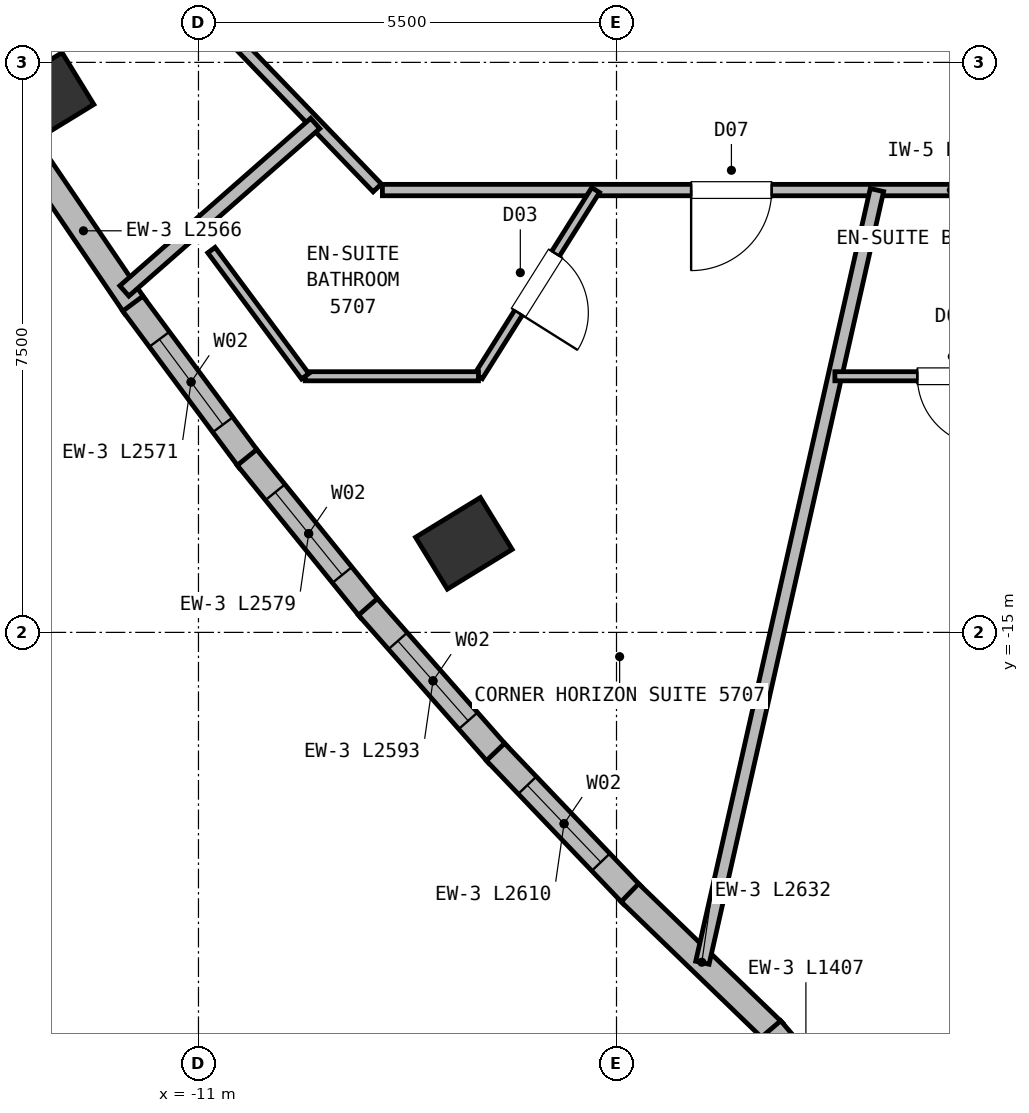
"""IFC4 building model, lengths in metres.
Left out: names, types, materials, properties, quantities, classifications, styles, units other than length and angle.
Written with IfcOpenShell. Run it as: python <this file> out.ifc"""

import sys

from ifc_helpers import new_model, si_unit, direction, frame, frame_2d, origin, origin_2d, place, context, subcontext, project, spatial, rectangle, extrude, element, fill, save


model = new_model("IFC4")
c1 = context("Model", 3, precision=1e-05, world=origin(), true_north=direction((0.0, 1.0)))
c2 = subcontext(c1, "Body", "Model", "MODEL_VIEW")
j1 = project(units=[si_unit("LENGTHUNIT", "METRE"), si_unit("PLANEANGLEUNIT", "RADIAN")], contexts=[c1])
p1 = place(None, origin())
s1 = spatial("IfcSite", under=j1, at=p1, CompositionType="ELEMENT")
p2 = place(p1, origin())
s2 = spatial("IfcBuilding", under=s1, at=p2, CompositionType="ELEMENT")
p3 = place(p2, frame((0.0, 0.0, 216.95)))
s3 = spatial("IfcBuildingStorey", under=s2, at=p3, CompositionType="ELEMENT", Elevation=216.95)
for number, where, z_axis, x_axis in (
    (1, (-13.012, -7.974, 0.0), (0.0, 0.0, 1.0), (-0.522, 0.853, 0.0)),
    (2, (-7.508, -13.828, 0.0), (0.0, 0.0, 1.0), (-0.522, 0.853, 0.0)),
):
    element("IfcColumn", number, at=place(p3, frame(where, z_axis=z_axis, x_axis=x_axis)), inside=s3, PredefinedType="COLUMN", context=c2, shape_type="SweptSolid", body=[
        extrude(rectangle(XDim=0.8, YDim=1.0, at=origin_2d()), origin(), (0.0, 0.0, 1.0), 3.8),
    ])
p4 = place(p3, frame((-11.834, -10.715, 0.0), z_axis=(0.0, 0.0, 1.0), x_axis=(-0.562164288669, 0.827025581554, 0.0)))
e3 = element("IfcWall", 3, at=p4, inside=s3, PredefinedType="SOLIDWALL", context=c2, shape_type="SweptSolid", body=[
    extrude(rectangle(XDim=2.566, YDim=0.33, at=frame_2d((1.283, 0.0))), origin(), (0.0, 0.0, 1.0), 3.55),
])
p5 = place(p3, frame((-10.331, -12.738, 0.0), z_axis=(0.0, 0.0, 1.0), x_axis=(-0.596178851143, 0.802851653451, 0.0)))
e4 = element("IfcWall", 4, at=p5, inside=s3, PredefinedType="SOLIDWALL", context=c2, shape_type="SweptSolid", body=[
    extrude(rectangle(XDim=2.571, YDim=0.33, at=frame_2d((1.285, 0.0))), origin(), (0.0, 0.0, 1.0), 3.55),
])
p6 = place(p5, frame((0.585, 0.0, 0.72)))
e5 = element("IfcOpeningElement", 5, at=p6, cuts=e4, PredefinedType="OPENING", context=c2, shape_type="SweptSolid", body=[
    extrude(rectangle(XDim=1.4, YDim=1.84, at=frame_2d((0.7, 0.92))), frame((0.0, 0.175, 0.0), z_axis=(0.0, -1.0, 0.0), x_axis=(1.0, 0.0, 0.0)), (0.0, 0.0, 1.0), 0.35),
])
p7 = place(p3, frame((-8.739, -14.703, 0.0), z_axis=(0.0, 0.0, 1.0), x_axis=(-0.629151938827, 0.777282341154, 0.0)))
e6 = element("IfcWall", 6, at=p7, inside=s3, PredefinedType="SOLIDWALL", context=c2, shape_type="SweptSolid", body=[
    extrude(rectangle(XDim=2.579, YDim=0.33, at=frame_2d((1.29, 0.0))), origin(), (0.0, 0.0, 1.0), 3.55),
])
p8 = place(p7, frame((0.59, 0.0, 0.72)))
e7 = element("IfcOpeningElement", 7, at=p8, cuts=e6, PredefinedType="OPENING", context=c2, shape_type="SweptSolid", body=[
    extrude(rectangle(XDim=1.4, YDim=1.84, at=frame_2d((0.7, 0.92))), frame((0.0, 0.175, 0.0), z_axis=(0.0, -1.0, 0.0), x_axis=(1.0, 0.0, 0.0)), (0.0, 0.0, 1.0), 0.35),
])
p9 = place(p3, frame((-7.058, -16.611, 0.0), z_axis=(0.0, 0.0, 1.0), x_axis=(-0.660708561144, 0.75064252293, 0.0)))
e8 = element("IfcWall", 8, at=p9, inside=s3, PredefinedType="SOLIDWALL", context=c2, shape_type="SweptSolid", body=[
    extrude(rectangle(XDim=2.593, YDim=0.33, at=frame_2d((1.296, 0.0))), origin(), (0.0, 0.0, 1.0), 3.55),
])
p10 = place(p9, frame((0.596, 0.0, 0.72)))
e9 = element("IfcOpeningElement", 9, at=p10, cuts=e8, PredefinedType="OPENING", context=c2, shape_type="SweptSolid", body=[
    extrude(rectangle(XDim=1.4, YDim=1.84, at=frame_2d((0.7, 0.92))), frame((0.0, 0.175, 0.0), z_axis=(0.0, -1.0, 0.0), x_axis=(1.0, 0.0, 0.0)), (0.0, 0.0, 1.0), 0.35),
])
p11 = place(p3, frame((-5.289, -18.461, 0.0), z_axis=(0.0, 0.0, 1.0), x_axis=(-0.690836041792, 0.723011454516, 0.0)))
e10 = element("IfcWall", 10, at=p11, inside=s3, PredefinedType="SOLIDWALL", context=c2, shape_type="SweptSolid", body=[
    extrude(rectangle(XDim=2.61, YDim=0.33, at=frame_2d((1.305, 0.0))), origin(), (0.0, 0.0, 1.0), 3.55),
])
p12 = place(p11, frame((0.605, 0.0, 0.72)))
e11 = element("IfcOpeningElement", 11, at=p12, cuts=e10, PredefinedType="OPENING", context=c2, shape_type="SweptSolid", body=[
    extrude(rectangle(XDim=1.4, YDim=1.84, at=frame_2d((0.7, 0.92))), frame((0.0, 0.175, 0.0), z_axis=(0.0, -1.0, 0.0), x_axis=(1.0, 0.0, 0.0)), (0.0, 0.0, 1.0), 0.35),
])
p13 = place(p3, frame((-3.431, -20.254, 0.0), z_axis=(0.0, 0.0, 1.0), x_axis=(-0.719291162425, 0.694708732964, 0.0)))
e12 = element("IfcWall", 12, at=p13, inside=s3, PredefinedType="SOLIDWALL", context=c2, shape_type="SweptSolid", body=[
    extrude(rectangle(XDim=2.632, YDim=0.33, at=frame_2d((1.316, 0.0))), origin(), (0.0, 0.0, 1.0), 3.55),
])
p14 = place(p3, frame((-2.551, -21.288, 0.0), z_axis=(0.0, 0.0, 1.0), x_axis=(-0.649318671118, 0.760516445146, 0.0)))
e13 = element("IfcWall", 13, at=p14, inside=s3, PredefinedType="SOLIDWALL", context=c2, shape_type="SweptSolid", body=[
    extrude(rectangle(XDim=1.407, YDim=0.33, at=frame_2d((0.704, 0.0))), origin(), (0.0, 0.0, 1.0), 3.55),
])
p15 = place(p3, frame((8.58, -9.18, 0.0), z_axis=(0.0, 0.0, 1.0), x_axis=(-1.0, 0.0, 0.0)))
e14 = element("IfcWall", 14, at=p15, inside=s3, PredefinedType="PARTITIONING", context=c2, shape_type="SweptSolid", body=[
    extrude(rectangle(XDim=17.16, YDim=0.15, at=frame_2d((8.58, 0.0))), origin(), (0.0, 0.0, 1.0), 3.23),
])
p16 = place(p15, frame((3.916, 0.0, 0.0)))
e15 = element("IfcOpeningElement", 15, at=p16, cuts=e14, PredefinedType="OPENING", context=c2, shape_type="SweptSolid", body=[
    extrude(rectangle(XDim=0.95, YDim=2.1, at=frame_2d((0.475, 1.05))), frame((0.0, 0.085, 0.0), z_axis=(0.0, -1.0, 0.0), x_axis=(1.0, 0.0, 0.0)), (0.0, 0.0, 1.0), 0.17),
])
p17 = place(p15, frame((1.363, 0.0, 0.0)))
e16 = element("IfcOpeningElement", 16, at=p17, cuts=e14, PredefinedType="OPENING", context=c2, shape_type="SweptSolid", body=[
    extrude(rectangle(XDim=1.0, YDim=2.15, at=frame_2d((0.5, 1.075))), frame((0.0, 0.085, 0.0), z_axis=(0.0, -1.0, 0.0), x_axis=(1.0, 0.0, 0.0)), (0.0, 0.0, 1.0), 0.17),
])
p18 = place(p15, frame((12.038, 0.0, 0.0)))
e17 = element("IfcOpeningElement", 17, at=p18, cuts=e14, PredefinedType="OPENING", context=c2, shape_type="SweptSolid", body=[
    extrude(rectangle(XDim=1.06, YDim=2.15, at=frame_2d((0.53, 1.075))), frame((0.0, 0.085, 0.0), z_axis=(0.0, -1.0, 0.0), x_axis=(1.0, 0.0, 0.0)), (0.0, 0.0, 1.0), 0.17),
])
p19 = place(p15, frame((6.251, 0.0, 0.0)))
e18 = element("IfcOpeningElement", 18, at=p19, cuts=e14, PredefinedType="OPENING", context=c2, shape_type="SweptSolid", body=[
    extrude(rectangle(XDim=1.06, YDim=2.15, at=frame_2d((0.53, 1.075))), frame((0.0, 0.085, 0.0), z_axis=(0.0, -1.0, 0.0), x_axis=(1.0, 0.0, 0.0)), (0.0, 0.0, 1.0), 0.17),
])
p20 = place(p3, frame((-8.648, -9.151, 0.0), z_axis=(0.0, 0.0, 1.0), x_axis=(-0.693764562202, 0.720201869085, 0.0)))
e19 = element("IfcWall", 19, at=p20, inside=s3, PredefinedType="PARTITIONING", context=c2, shape_type="SweptSolid", body=[
    extrude(rectangle(XDim=2.558, YDim=0.15, at=frame_2d((1.279, 0.0))), origin(), (0.0, 0.0, 1.0), 3.23),
])
p21 = place(p3, frame((-9.464, -8.304, 0.0), z_axis=(0.0, 0.0, 1.0), x_axis=(-0.751711445712, -0.659492154909, 0.0)))
e20 = element("IfcWall", 20, at=p21, inside=s3, PredefinedType="PARTITIONING", context=c2, shape_type="SweptSolid", body=[
    extrude(rectangle(XDim=3.341, YDim=0.18, at=frame_2d((1.67, 0.0))), origin(), (0.0, 0.0, 1.0), 3.55),
])
p22 = place(p3, frame((-5.775, -9.18, 0.0), z_axis=(0.0, 0.0, 1.0), x_axis=(-0.532491083383, -0.846435612506, 0.0)))
e21 = element("IfcWall", 21, at=p22, inside=s3, PredefinedType="PARTITIONING", context=c2, shape_type="SweptSolid", body=[
    extrude(rectangle(XDim=2.895, YDim=0.12, at=frame_2d((1.447, 0.0))), origin(), (0.0, 0.0, 1.0), 3.55),
])
p23 = place(p22, frame((0.987, 0.0, 0.0)))
e22 = element("IfcOpeningElement", 22, at=p23, cuts=e21, PredefinedType="OPENING", context=c2, shape_type="SweptSolid", body=[
    extrude(rectangle(XDim=0.92, YDim=2.1, at=frame_2d((0.46, 1.05))), frame((0.0, 0.07, 0.0), z_axis=(0.0, -1.0, 0.0), x_axis=(1.0, 0.0, 0.0)), (0.0, 0.0, 1.0), 0.14),
])
p24 = place(p3, frame((-7.316, -11.63, 0.0), z_axis=(0.0, 0.0, 1.0), x_axis=(-1.0, 0.0, 0.0)))
e23 = element("IfcWall", 23, at=p24, inside=s3, PredefinedType="PARTITIONING", context=c2, shape_type="SweptSolid", body=[
    extrude(rectangle(XDim=2.28, YDim=0.12, at=frame_2d((1.14, 0.0))), origin(), (0.0, 0.0, 1.0), 3.55),
])
p25 = place(p3, frame((-10.829, -9.97, 0.0), z_axis=(0.0, 0.0, 1.0), x_axis=(0.596291397786, -0.802768066708, 0.0)))
e24 = element("IfcWall", 24, at=p25, inside=s3, PredefinedType="PARTITIONING", context=c2, shape_type="SweptSolid", body=[
    extrude(rectangle(XDim=2.068, YDim=0.12, at=frame_2d((1.034, 0.0))), origin(), (0.0, 0.0, 1.0), 2.98),
])
p26 = place(p3, frame((-2.073, -9.18, 0.0), z_axis=(0.0, 0.0, 1.0), x_axis=(-0.220339233084, -0.975423304194, 0.0)))
e25 = element("IfcWall", 25, at=p26, inside=s3, PredefinedType="PARTITIONING", context=c2, shape_type="SweptSolid", body=[
    extrude(rectangle(XDim=10.423, YDim=0.18, at=frame_2d((5.211, 0.0))), origin(), (0.0, 0.0, 1.0), 3.55),
])
p27 = place(p3, frame((0.463, -11.63, 0.0), z_axis=(0.0, 0.0, 1.0), x_axis=(-1.0, 0.0, 0.0)))
e26 = element("IfcWall", 26, at=p27, inside=s3, PredefinedType="PARTITIONING", context=c2, shape_type="SweptSolid", body=[
    extrude(rectangle(XDim=3.09, YDim=0.12, at=frame_2d((1.545, 0.0))), origin(), (0.0, 0.0, 1.0), 3.23),
])
p28 = place(p27, frame((1.085, 0.0, 0.0)))
e27 = element("IfcOpeningElement", 27, at=p28, cuts=e26, PredefinedType="OPENING", context=c2, shape_type="SweptSolid", body=[
    extrude(rectangle(XDim=0.92, YDim=2.1, at=frame_2d((0.46, 1.05))), frame((0.0, 0.07, 0.0), z_axis=(0.0, -1.0, 0.0), x_axis=(1.0, 0.0, 0.0)), (0.0, 0.0, 1.0), 0.14),
])
p29 = place(p6, origin())
e28 = element("IfcWindow", 28, at=p29, inside=s3, PartitioningType="SINGLE_PANEL", PredefinedType="WINDOW", context=c2, shape_type="SweptSolid", body=[
    extrude(rectangle(XDim=1.4, YDim=1.84, at=frame_2d((0.7, 0.92))), frame((0.0, 0.03, 0.0), z_axis=(0.0, -1.0, 0.0), x_axis=(1.0, 0.0, 0.0)), (0.0, 0.0, 1.0), 0.06),
])
fill(e5, e28)
p30 = place(p8, origin())
e29 = element("IfcWindow", 29, at=p30, inside=s3, PartitioningType="SINGLE_PANEL", PredefinedType="WINDOW", context=c2, shape_type="SweptSolid", body=[
    extrude(rectangle(XDim=1.4, YDim=1.84, at=frame_2d((0.7, 0.92))), frame((0.0, 0.03, 0.0), z_axis=(0.0, -1.0, 0.0), x_axis=(1.0, 0.0, 0.0)), (0.0, 0.0, 1.0), 0.06),
])
fill(e7, e29)
p31 = place(p10, origin())
e30 = element("IfcWindow", 30, at=p31, inside=s3, PartitioningType="SINGLE_PANEL", PredefinedType="WINDOW", context=c2, shape_type="SweptSolid", body=[
    extrude(rectangle(XDim=1.4, YDim=1.84, at=frame_2d((0.7, 0.92))), frame((0.0, 0.03, 0.0), z_axis=(0.0, -1.0, 0.0), x_axis=(1.0, 0.0, 0.0)), (0.0, 0.0, 1.0), 0.06),
])
fill(e9, e30)
p32 = place(p12, origin())
e31 = element("IfcWindow", 31, at=p32, inside=s3, PartitioningType="SINGLE_PANEL", PredefinedType="WINDOW", context=c2, shape_type="SweptSolid", body=[
    extrude(rectangle(XDim=1.4, YDim=1.84, at=frame_2d((0.7, 0.92))), frame((0.0, 0.03, 0.0), z_axis=(0.0, -1.0, 0.0), x_axis=(1.0, 0.0, 0.0)), (0.0, 0.0, 1.0), 0.06),
])
fill(e11, e31)
p33 = place(p23, origin())
e32 = element("IfcDoor", 32, at=p33, inside=s3, OperationType="SINGLE_SWING_RIGHT", PredefinedType="DOOR", context=c2, shape_type="SweptSolid", body=[
    extrude(rectangle(XDim=0.92, YDim=2.1, at=frame_2d((0.46, 1.05))), frame((0.0, 0.025, 0.0), z_axis=(0.0, -1.0, 0.0), x_axis=(1.0, 0.0, 0.0)), (0.0, 0.0, 1.0), 0.05),
])
fill(e22, e32)
p34 = place(p28, origin())
e33 = element("IfcDoor", 33, at=p34, inside=s3, OperationType="SINGLE_SWING_LEFT", PredefinedType="DOOR", context=c2, shape_type="SweptSolid", body=[
    extrude(rectangle(XDim=0.92, YDim=2.1, at=frame_2d((0.46, 1.05))), frame((0.0, 0.025, 0.0), z_axis=(0.0, -1.0, 0.0), x_axis=(1.0, 0.0, 0.0)), (0.0, 0.0, 1.0), 0.05),
])
fill(e27, e33)
p35 = place(p18, origin())
e34 = element("IfcDoor", 34, at=p35, inside=s3, OperationType="SINGLE_SWING_RIGHT", PredefinedType="DOOR", context=c2, shape_type="SweptSolid", body=[
    extrude(rectangle(XDim=1.06, YDim=2.15, at=frame_2d((0.53, 1.075))), frame((0.0, 0.025, 0.0), z_axis=(0.0, -1.0, 0.0), x_axis=(1.0, 0.0, 0.0)), (0.0, 0.0, 1.0), 0.05),
])
fill(e17, e34)
save(model, sys.argv[1])
